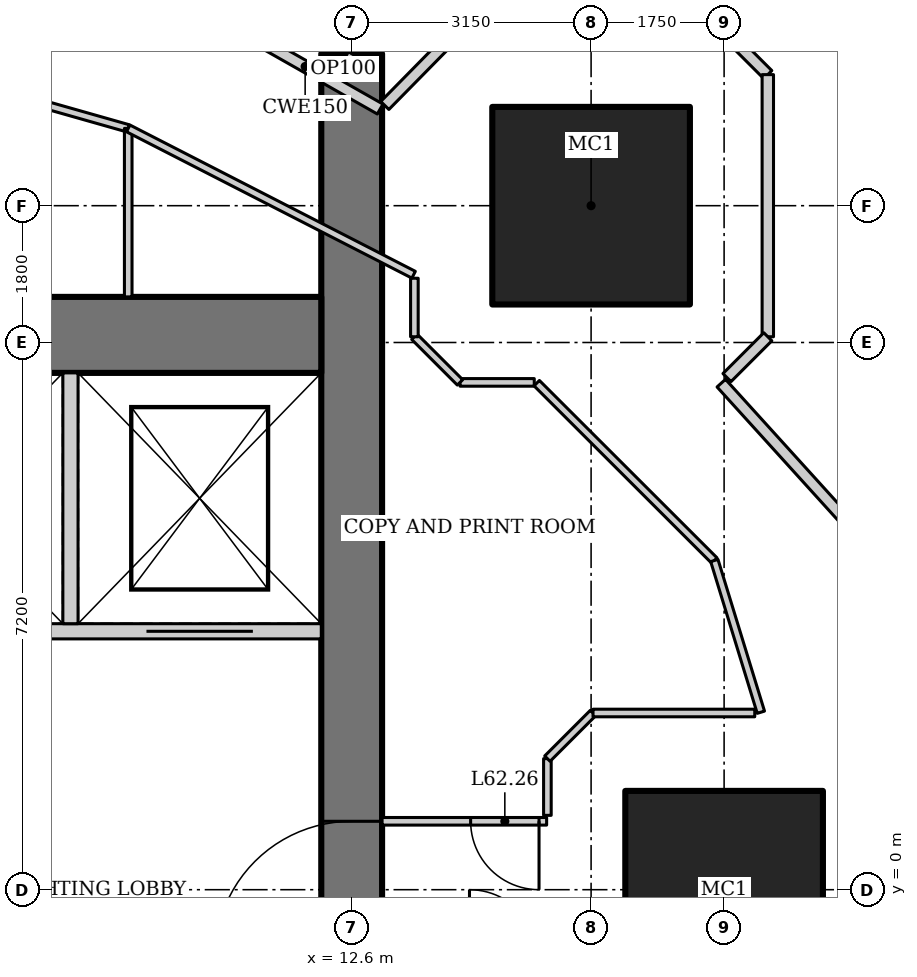
"""IFC4 building model, lengths in metres.
Left out: names, types, materials, properties, quantities, classifications, styles, units other than length and angle.
Written with IfcOpenShell. Run it as: python <this file> out.ifc"""

import sys

from ifc_helpers import new_model, si_unit, direction, frame, frame_2d, origin, origin_2d, place, context, subcontext, project, spatial, rectangle, hollow_rectangle, extrude, element, fill, save


model = new_model("IFC4")
c1 = context("Model", 3, precision=1e-05, world=origin(), true_north=direction((0.0, 1.0)))
c2 = subcontext(c1, "Body", "Model", "MODEL_VIEW")
j1 = project(units=[si_unit("LENGTHUNIT", "METRE"), si_unit("PLANEANGLEUNIT", "RADIAN")], contexts=[c1])
p1 = place(None, origin())
s1 = spatial("IfcSite", under=j1, at=p1, CompositionType="ELEMENT")
p2 = place(p1, origin())
s2 = spatial("IfcBuilding", under=s1, at=p2, CompositionType="ELEMENT")
p3 = place(p2, frame((0.0, 0.0, 266.2)))
s3 = spatial("IfcBuildingStorey", under=s2, at=p3, CompositionType="ELEMENT", Elevation=266.2)
for number, where, z_axis, x_axis in (
    (1, (17.5, 0.0, 0.0), (0.0, 0.0, 1.0), (1.0, 0.0, 0.0)),
    (2, (15.75, 9.0, 0.0), (0.0, 0.0, 1.0), (1.0, 0.0, 0.0)),
):
    element("IfcColumn", number, at=place(p3, frame(where, z_axis=z_axis, x_axis=x_axis)), inside=s3, PredefinedType="COLUMN", context=c2, shape_type="SweptSolid", body=[
        extrude(hollow_rectangle(XDim=2.6, YDim=2.6, WallThickness=0.13, at=origin_2d()), origin(), (0.0, 0.0, 1.0), 4.2),
    ])
p4 = place(p3, frame((20.423, 11.67, 0.0), z_axis=(-0.310472199469, -0.177420864126, 0.933878391617), x_axis=(0.496156180016, -0.868233289521, 0.0)))
e3 = element("IfcColumn", 3, at=p4, inside=s3, PredefinedType="COLUMN", context=c2, shape_type="SweptSolid", body=[
    extrude(hollow_rectangle(XDim=1.2, YDim=1.2, WallThickness=0.1, at=origin_2d()), origin(), (0.0, 0.0, 1.0), 4.264),
])
p5 = place(p3, frame((12.6, -11.0, 0.0), z_axis=(0.0, 0.0, 1.0), x_axis=(0.0, 1.0, 0.0)))
e4 = element("IfcWall", 4, at=p5, inside=s3, PredefinedType="SHEAR", context=c2, shape_type="SweptSolid", body=[
    extrude(rectangle(XDim=22.0, YDim=0.8, at=frame_2d((11.0, 0.0))), origin(), (0.0, 0.0, 1.0), 4.2),
])
p6 = place(p5, frame((10.1, 0.0, 0.0)))
e5 = element("IfcOpeningElement", 5, at=p6, cuts=e4, PredefinedType="OPENING", context=c2, shape_type="SweptSolid", body=[
    extrude(rectangle(XDim=1.8, YDim=2.1, at=frame_2d((0.9, 1.05))), frame((0.0, 0.41, 0.0), z_axis=(0.0, -1.0, 0.0), x_axis=(1.0, 0.0, 0.0)), (0.0, 0.0, 1.0), 0.82),
])
p7 = place(p3, frame((12.2, 7.3, 0.0), z_axis=(0.0, 0.0, 1.0), x_axis=(-1.0, 0.0, 0.0)))
e6 = element("IfcWall", 6, at=p7, inside=s3, PredefinedType="SHEAR", context=c2, shape_type="SweptSolid", body=[
    extrude(rectangle(XDim=6.6, YDim=1.0, at=frame_2d((3.3, 0.0))), origin(), (0.0, 0.0, 1.0), 4.2),
])
p8 = place(p3, frame((12.2, 3.4, 0.0), z_axis=(0.0, 0.0, 1.0), x_axis=(-1.0, 0.0, 0.0)))
e7 = element("IfcWall", 7, at=p8, inside=s3, PredefinedType="SOLIDWALL", context=c2, shape_type="SweptSolid", body=[
    extrude(rectangle(XDim=6.6, YDim=0.2, at=frame_2d((3.3, 0.0))), origin(), (0.0, 0.0, 1.0), 4.2),
])
p9 = place(p8, frame((4.45, 0.0, 0.0)))
e8 = element("IfcOpeningElement", 8, at=p9, cuts=e7, PredefinedType="OPENING", context=c2, shape_type="SweptSolid", body=[
    extrude(rectangle(XDim=1.1, YDim=2.2, at=frame_2d((0.55, 1.1))), frame((0.0, 0.11, 0.0), z_axis=(0.0, -1.0, 0.0), x_axis=(1.0, 0.0, 0.0)), (0.0, 0.0, 1.0), 0.22),
])
p10 = place(p8, frame((0.9, 0.0, 0.0)))
e9 = element("IfcOpeningElement", 9, at=p10, cuts=e7, PredefinedType="OPENING", context=c2, shape_type="SweptSolid", body=[
    extrude(rectangle(XDim=1.4, YDim=2.2, at=frame_2d((0.7, 1.1))), frame((0.0, 0.11, 0.0), z_axis=(0.0, -1.0, 0.0), x_axis=(1.0, 0.0, 0.0)), (0.0, 0.0, 1.0), 0.22),
])
p11 = place(p3, frame((8.9, 3.5, 0.0), z_axis=(0.0, 0.0, 1.0), x_axis=(0.0, 1.0, 0.0)))
e10 = element("IfcWall", 10, at=p11, inside=s3, PredefinedType="SOLIDWALL", context=c2, shape_type="SweptSolid", body=[
    extrude(rectangle(XDim=3.3, YDim=0.2, at=frame_2d((1.65, 0.0))), origin(), (0.0, 0.0, 1.0), 4.2),
])
p12 = place(p3, frame((5.68, 11.147, 0.0), z_axis=(0.0, 0.0, 1.0), x_axis=(0.961970251804, -0.27315423234, 0.0)))
e11 = element("IfcWall", 11, at=p12, inside=s3, PredefinedType="PARTITIONING", context=c2, shape_type="SweptSolid", body=[
    extrude(rectangle(XDim=4.137, YDim=0.1, at=frame_2d((2.069, 0.0))), origin(), (0.0, 0.0, 1.0), 4.05),
])
p13 = place(p3, frame((9.66, 10.017, 0.0), z_axis=(0.0, 0.0, 1.0), x_axis=(0.0, -1.0, 0.0)))
e12 = element("IfcWall", 12, at=p13, inside=s3, PredefinedType="PARTITIONING", context=c2, shape_type="SweptSolid", body=[
    extrude(rectangle(XDim=2.217, YDim=0.1, at=frame_2d((1.108, 0.0))), origin(), (0.0, 0.0, 1.0), 4.05),
])
p14 = place(p3, frame((12.6, 11.0, 0.0), z_axis=(0.0, 0.0, 1.0), x_axis=(-0.493794495037, -0.869578631678, 0.0)))
e13 = element("IfcWall", 13, at=p14, inside=s3, PredefinedType="PARTITIONING", context=c2, shape_type="SweptSolid", body=[
    extrude(rectangle(XDim=0.449, YDim=0.1, at=frame_2d((0.225, 0.0))), origin(), (0.0, 0.0, 1.0), 4.05),
])
p15 = place(p3, frame((19.172, 4.78, 0.0), z_axis=(0.0, 0.0, 1.0), x_axis=(-0.671721890643, 0.74080341632, 0.0)))
e14 = element("IfcWall", 14, at=p15, inside=s3, PredefinedType="PARTITIONING", context=c2, shape_type="SweptSolid", body=[
    extrude(rectangle(XDim=2.544, YDim=0.15, at=frame_2d((1.272, 0.0))), origin(), (0.0, 0.0, 1.0), 4.05),
])
p16 = place(p3, frame((12.975, 10.271, 0.0), z_axis=(0.0, 0.0, 1.0), x_axis=(-0.869722107117, 0.493541747366, 0.0)))
e15 = element("IfcWall", 15, at=p16, inside=s3, PredefinedType="PARTITIONING", context=c2, shape_type="SweptSolid", body=[
    extrude(rectangle(XDim=2.27, YDim=0.15, at=frame_2d((1.135, 0.0))), origin(), (0.0, 0.0, 1.0), 4.05),
])
p17 = place(p3, frame((9.66, 10.017, 0.0), z_axis=(0.0, 0.0, 1.0), x_axis=(0.889833724874, -0.456284935185, 0.0)))
e16 = element("IfcWall", 16, at=p17, inside=s3, PredefinedType="PARTITIONING", context=c2, shape_type="SweptSolid", body=[
    extrude(rectangle(XDim=4.22, YDim=0.1, at=frame_2d((2.11, 0.0))), origin(), (0.0, 0.0, 1.0), 4.05),
])
p18 = place(p3, frame((15.035, 6.665, 0.0), z_axis=(0.0, 0.0, 1.0), x_axis=(0.707587114823, -0.70662612104, 0.0)))
e17 = element("IfcWall", 17, at=p18, inside=s3, PredefinedType="PARTITIONING", context=c2, shape_type="SweptSolid", body=[
    extrude(rectangle(XDim=3.303, YDim=0.1, at=frame_2d((1.651, 0.0))), origin(), (0.0, 0.0, 1.0), 4.05),
])
p19 = place(p3, frame((15.002, 6.675, 0.0), z_axis=(0.0, 0.0, 1.0), x_axis=(-1.0, 0.0, 0.0)))
e18 = element("IfcWall", 18, at=p19, inside=s3, PredefinedType="PARTITIONING", context=c2, shape_type="SweptSolid", body=[
    extrude(rectangle(XDim=0.977, YDim=0.1, at=frame_2d((0.488, 0.0))), origin(), (0.0, 0.0, 1.0), 4.05),
])
p20 = place(p3, frame((14.025, 6.675, 0.0), z_axis=(0.0, 0.0, 1.0), x_axis=(-0.707106781187, 0.707106781187, 0.0)))
e19 = element("IfcWall", 19, at=p20, inside=s3, PredefinedType="PARTITIONING", context=c2, shape_type="SweptSolid", body=[
    extrude(rectangle(XDim=0.849, YDim=0.1, at=frame_2d((0.425, 0.0))), origin(), (0.0, 0.0, 1.0), 4.05),
])
p21 = place(p3, frame((13.425, 7.275, 0.0), z_axis=(0.0, 0.0, 1.0), x_axis=(0.0, 1.0, 0.0)))
e20 = element("IfcWall", 20, at=p21, inside=s3, PredefinedType="PARTITIONING", context=c2, shape_type="SweptSolid", body=[
    extrude(rectangle(XDim=0.77, YDim=0.1, at=frame_2d((0.385, 0.0))), origin(), (0.0, 0.0, 1.0), 4.05),
])
p22 = place(p3, frame((13.036, 10.319, 0.0), z_axis=(0.0, 0.0, 1.0), x_axis=(0.701113567316, 0.713049623606, 0.0)))
e21 = element("IfcWall", 21, at=p22, inside=s3, PredefinedType="PARTITIONING", context=c2, shape_type="SweptSolid", body=[
    extrude(rectangle(XDim=1.411, YDim=0.15, at=frame_2d((0.706, 0.0))), origin(), (0.0, 0.0, 1.0), 4.05),
])
p23 = place(p3, frame((17.475, 11.325, 0.0), z_axis=(0.0, 0.0, 1.0), x_axis=(0.707106781187, -0.707106781187, 0.0)))
e22 = element("IfcWall", 22, at=p23, inside=s3, PredefinedType="PARTITIONING", context=c2, shape_type="SweptSolid", body=[
    extrude(rectangle(XDim=0.849, YDim=0.15, at=frame_2d((0.425, 0.0))), origin(), (0.0, 0.0, 1.0), 4.05),
])
p24 = place(p3, frame((18.075, 10.725, 0.0), z_axis=(0.0, 0.0, 1.0), x_axis=(0.0, -1.0, 0.0)))
e23 = element("IfcWall", 23, at=p24, inside=s3, PredefinedType="PARTITIONING", context=c2, shape_type="SweptSolid", body=[
    extrude(rectangle(XDim=3.449, YDim=0.15, at=frame_2d((1.725, 0.0))), origin(), (0.0, 0.0, 1.0), 3.522),
])
p25 = place(p3, frame((18.075, 7.275, 0.0), z_axis=(0.0, 0.0, 1.0), x_axis=(-0.707106781187, -0.707106781187, 0.0)))
e24 = element("IfcWall", 24, at=p25, inside=s3, PredefinedType="PARTITIONING", context=c2, shape_type="SweptSolid", body=[
    extrude(rectangle(XDim=0.76, YDim=0.15, at=frame_2d((0.38, 0.0))), origin(), (0.0, 0.0, 1.0), 4.05),
])
p26 = place(p3, frame((17.372, 4.331, 0.0), z_axis=(0.0, 0.0, 1.0), x_axis=(0.293231279211, -0.956041535129, 0.0)))
e25 = element("IfcWall", 25, at=p26, inside=s3, PredefinedType="PARTITIONING", context=c2, shape_type="SweptSolid", body=[
    extrude(rectangle(XDim=2.088, YDim=0.1, at=frame_2d((1.044, 0.0))), origin(), (0.0, 0.0, 1.0), 4.05),
])
p27 = place(p3, frame((15.165, 0.9, 0.0), z_axis=(0.0, 0.0, 1.0), x_axis=(-1.0, 0.0, 0.0)))
e26 = element("IfcWall", 26, at=p27, inside=s3, PredefinedType="PARTITIONING", context=c2, shape_type="SweptSolid", body=[
    extrude(rectangle(XDim=2.165, YDim=0.1, at=frame_2d((1.083, 0.0))), origin(), (0.0, 0.0, 1.0), 4.05),
])
p28 = place(p27, frame((0.1, 0.0, 0.0)))
e27 = element("IfcOpeningElement", 27, at=p28, cuts=e26, PredefinedType="OPENING", context=c2, shape_type="SweptSolid", body=[
    extrude(rectangle(XDim=0.9, YDim=2.1, at=frame_2d((0.45, 1.05))), frame((0.0, 0.06, 0.0), z_axis=(0.0, -1.0, 0.0), x_axis=(1.0, 0.0, 0.0)), (0.0, 0.0, 1.0), 0.12),
])
p29 = place(p3, frame((15.175, 0.978, 0.0), z_axis=(0.0, 0.0, 1.0), x_axis=(0.0, 1.0, 0.0)))
e28 = element("IfcWall", 28, at=p29, inside=s3, PredefinedType="PARTITIONING", context=c2, shape_type="SweptSolid", body=[
    extrude(rectangle(XDim=0.746, YDim=0.1, at=frame_2d((0.373, 0.0))), origin(), (0.0, 0.0, 1.0), 4.05),
])
p30 = place(p3, frame((15.175, 1.725, 0.0), z_axis=(0.0, 0.0, 1.0), x_axis=(0.707106781187, 0.707106781187, 0.0)))
e29 = element("IfcWall", 29, at=p30, inside=s3, PredefinedType="PARTITIONING", context=c2, shape_type="SweptSolid", body=[
    extrude(rectangle(XDim=0.849, YDim=0.1, at=frame_2d((0.425, 0.0))), origin(), (0.0, 0.0, 1.0), 4.05),
])
p31 = place(p3, frame((15.775, 2.325, 0.0), z_axis=(0.0, 0.0, 1.0), x_axis=(1.0, 0.0, 0.0)))
e30 = element("IfcWall", 30, at=p31, inside=s3, PredefinedType="PARTITIONING", context=c2, shape_type="SweptSolid", body=[
    extrude(rectangle(XDim=2.128, YDim=0.1, at=frame_2d((1.064, 0.0))), origin(), (0.0, 0.0, 1.0), 4.05),
])
p32 = place(p6, origin())
e31 = element("IfcDoor", 31, at=p32, inside=s3, OperationType="DOUBLE_DOOR_DOUBLE_SWING", PredefinedType="DOOR", context=c2, shape_type="SweptSolid", body=[
    extrude(rectangle(XDim=1.8, YDim=2.1, at=frame_2d((0.9, 1.05))), frame((0.0, 0.025, 0.0), z_axis=(0.0, -1.0, 0.0), x_axis=(1.0, 0.0, 0.0)), (0.0, 0.0, 1.0), 0.05),
])
fill(e5, e31)
p33 = place(p10, origin())
e32 = element("IfcDoor", 32, at=p33, inside=s3, OperationType="DOUBLE_DOOR_SLIDING", PredefinedType="DOOR", context=c2, shape_type="SweptSolid", body=[
    extrude(rectangle(XDim=1.4, YDim=2.2, at=frame_2d((0.7, 1.1))), frame((0.0, 0.025, 0.0), z_axis=(0.0, -1.0, 0.0), x_axis=(1.0, 0.0, 0.0)), (0.0, 0.0, 1.0), 0.05),
])
fill(e9, e32)
p34 = place(p28, origin())
e33 = element("IfcDoor", 33, at=p34, inside=s3, OperationType="SINGLE_SWING_LEFT", PredefinedType="DOOR", context=c2, shape_type="SweptSolid", body=[
    extrude(rectangle(XDim=0.9, YDim=2.1, at=frame_2d((0.45, 1.05))), frame((0.0, 0.025, 0.0), z_axis=(0.0, -1.0, 0.0), x_axis=(1.0, 0.0, 0.0)), (0.0, 0.0, 1.0), 0.05),
])
fill(e27, e33)
save(model, sys.argv[1])
